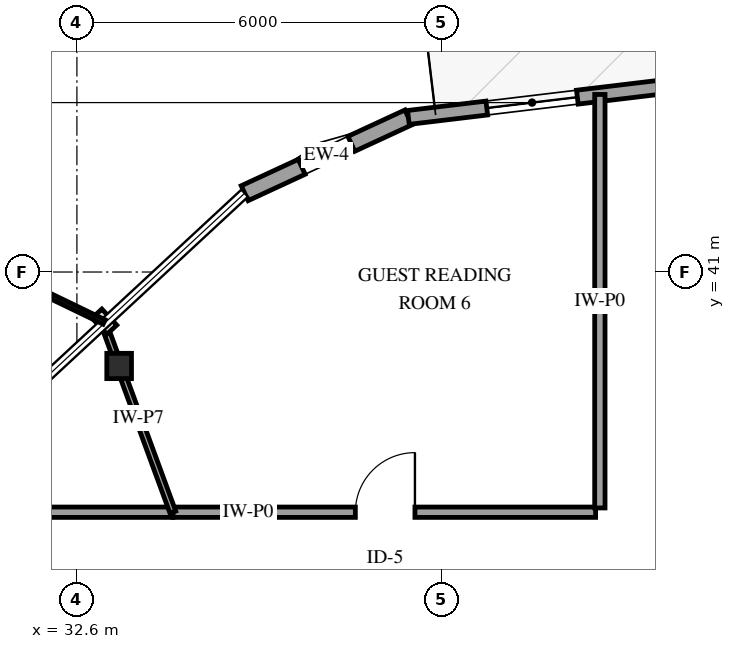
"""IFC4 building model, lengths in metres.
Left out: names, types, materials, properties, quantities, classifications, styles, units other than length and angle.
Written with IfcOpenShell. Run it as: python <this file> out.ifc"""

import sys

from ifc_helpers import new_model, si_unit, direction, frame, frame_2d, origin, origin_2d, place, context, subcontext, project, spatial, rectangle, i_section, extrude, element, fill, save


model = new_model("IFC4")
c1 = context("Model", 3, precision=1e-05, world=origin(), true_north=direction((0.0, 1.0)))
c2 = subcontext(c1, "Body", "Model", "MODEL_VIEW")
j1 = project(units=[si_unit("LENGTHUNIT", "METRE"), si_unit("PLANEANGLEUNIT", "RADIAN")], contexts=[c1])
p1 = place(None, origin())
s1 = spatial("IfcSite", under=j1, at=p1, CompositionType="ELEMENT")
p2 = place(p1, origin())
s2 = spatial("IfcBuilding", under=s1, at=p2, CompositionType="ELEMENT")
p3 = place(p2, frame((0.0, 0.0, 190.6)))
s3 = spatial("IfcBuildingStorey", under=s2, at=p3, CompositionType="ELEMENT", Elevation=190.6)
p4 = place(p3, frame((33.295, 39.455, -0.3), z_axis=(0.0, 0.0, 1.0), x_axis=(1.0, 0.0, 0.0)))
e1 = element("IfcColumn", 1, at=p4, inside=s3, PredefinedType="COLUMN", context=c2, shape_type="SweptSolid", body=[
    extrude(i_section(OverallWidth=0.406, OverallDepth=0.416, WebThickness=0.03, FlangeThickness=0.048, FilletRadius=0.038, at=origin_2d()), origin(), (0.0, 0.0, 1.0), 3.9),
])
p5 = place(p3, frame((38.051, 43.542, 0.0), z_axis=(0.0, 0.0, 1.0), x_axis=(-0.907501185291, -0.420049519337, 0.0)))
e2 = element("IfcWall", 2, at=p5, inside=s3, PredefinedType="SOLIDWALL", context=c2, shape_type="SweptSolid", body=[
    extrude(rectangle(XDim=2.967, YDim=0.27, at=frame_2d((1.483, 0.0))), origin(), (0.0, 0.0, 1.0), 2.679),
])
p6 = place(p5, frame((1.033, 0.0, 0.75)))
e3 = element("IfcOpeningElement", 3, at=p6, cuts=e2, PredefinedType="OPENING", context=c2, shape_type="SweptSolid", body=[
    extrude(rectangle(XDim=0.9, YDim=1.5, at=frame_2d((0.45, 0.75))), frame((0.0, 0.145, 0.0), z_axis=(0.0, -1.0, 0.0), x_axis=(1.0, 0.0, 0.0)), (0.0, 0.0, 1.0), 0.29),
])
p7 = place(p3, frame((47.366, 44.659, 0.0), z_axis=(0.0, 0.0, 1.0), x_axis=(-0.992882132133, -0.119101098615, 0.0)))
e4 = element("IfcWall", 4, at=p7, inside=s3, PredefinedType="SOLIDWALL", context=c2, shape_type="SweptSolid", body=[
    extrude(rectangle(XDim=9.382, YDim=0.23, at=frame_2d((4.691, 0.0))), origin(), (0.0, 0.0, 1.0), 2.679),
])
p8 = place(p7, frame((0.65, 0.0, 0.0)))
e5 = element("IfcOpeningElement", 5, at=p8, cuts=e4, PredefinedType="OPENING", context=c2, shape_type="SweptSolid", body=[
    extrude(rectangle(XDim=1.0, YDim=2.15, at=frame_2d((0.5, 1.075))), frame((0.0, 0.125, 0.0), z_axis=(0.0, -1.0, 0.0), x_axis=(1.0, 0.0, 0.0)), (0.0, 0.0, 1.0), 0.25),
])
p9 = place(p7, frame((6.583, 0.0, 0.72)))
e6 = element("IfcOpeningElement", 6, at=p9, cuts=e4, PredefinedType="OPENING", context=c2, shape_type="SweptSolid", body=[
    extrude(rectangle(XDim=1.5, YDim=1.7, at=frame_2d((0.75, 0.85))), frame((0.0, 0.125, 0.0), z_axis=(0.0, -1.0, 0.0), x_axis=(1.0, 0.0, 0.0)), (0.0, 0.0, 1.0), 0.25),
])
p10 = place(p3, frame((34.178, 37.05, 0.0), z_axis=(0.0, 0.0, 1.0), x_axis=(1.0, 0.0, 0.0)))
e7 = element("IfcWall", 7, at=p10, inside=s3, PredefinedType="PARTITIONING", context=c2, shape_type="SweptSolid", body=[
    extrude(rectangle(XDim=6.952, YDim=0.17, at=frame_2d((3.476, 0.0))), origin(), (0.0, 0.0, 1.0), 3.3),
])
p11 = place(p10, frame((3.001, 0.0, 0.0)))
e8 = element("IfcOpeningElement", 8, at=p11, cuts=e7, PredefinedType="OPENING", context=c2, shape_type="SweptSolid", body=[
    extrude(rectangle(XDim=0.98, YDim=2.15, at=frame_2d((0.49, 1.075))), frame((0.0, 0.095, 0.0), z_axis=(0.0, -1.0, 0.0), x_axis=(1.0, 0.0, 0.0)), (0.0, 0.0, 1.0), 0.19),
])
p12 = place(p3, frame((41.2, 37.12, 0.0), z_axis=(0.0, 0.0, 1.0), x_axis=(0.0, 1.0, 0.0)))
e9 = element("IfcWall", 9, at=p12, inside=s3, PredefinedType="PARTITIONING", context=c2, shape_type="SweptSolid", body=[
    extrude(rectangle(XDim=6.8, YDim=0.17, at=frame_2d((3.4, 0.0))), origin(), (0.0, 0.0, 1.0), 3.3),
])
p13 = place(p3, frame((29.702, 37.05, 0.0), z_axis=(0.0, 0.0, 1.0), x_axis=(1.0, 0.0, 0.0)))
e10 = element("IfcWall", 10, at=p13, inside=s3, PredefinedType="PARTITIONING", context=c2, shape_type="SweptSolid", body=[
    extrude(rectangle(XDim=4.476, YDim=0.17, at=frame_2d((2.238, 0.0))), origin(), (0.0, 0.0, 1.0), 3.3),
])
p14 = place(p3, frame((34.178, 37.05, 0.0), z_axis=(0.0, 0.0, 1.0), x_axis=(-0.344730941126, 0.938701538419, 0.0)))
e11 = element("IfcWall", 11, at=p14, inside=s3, PredefinedType="PARTITIONING", context=c2, shape_type="SweptSolid", body=[
    extrude(rectangle(XDim=3.298, YDim=0.1, at=frame_2d((1.649, 0.0))), origin(), (0.0, 0.0, 1.0), 2.595),
])
p15 = place(p6, origin())
e12 = element("IfcWindow", 12, at=p15, inside=s3, PartitioningType="SINGLE_PANEL", PredefinedType="WINDOW", context=c2, shape_type="SweptSolid", body=[
    extrude(rectangle(XDim=0.9, YDim=1.5, at=frame_2d((0.45, 0.75))), frame((0.0, 0.03, 0.0), z_axis=(0.0, -1.0, 0.0), x_axis=(1.0, 0.0, 0.0)), (0.0, 0.0, 1.0), 0.06),
])
fill(e3, e12)
p16 = place(p9, origin())
e13 = element("IfcWindow", 13, at=p16, inside=s3, PartitioningType="SINGLE_PANEL", PredefinedType="WINDOW", context=c2, shape_type="SweptSolid", body=[
    extrude(rectangle(XDim=1.5, YDim=1.7, at=frame_2d((0.75, 0.85))), frame((0.0, 0.03, 0.0), z_axis=(0.0, -1.0, 0.0), x_axis=(1.0, 0.0, 0.0)), (0.0, 0.0, 1.0), 0.06),
])
fill(e6, e13)
p17 = place(p11, origin())
e14 = element("IfcDoor", 14, at=p17, inside=s3, OperationType="SINGLE_SWING_RIGHT", PredefinedType="DOOR", context=c2, shape_type="SweptSolid", body=[
    extrude(rectangle(XDim=0.98, YDim=2.15, at=frame_2d((0.49, 1.075))), frame((0.0, 0.025, 0.0), z_axis=(0.0, -1.0, 0.0), x_axis=(1.0, 0.0, 0.0)), (0.0, 0.0, 1.0), 0.05),
])
fill(e8, e14)
save(model, sys.argv[1])
